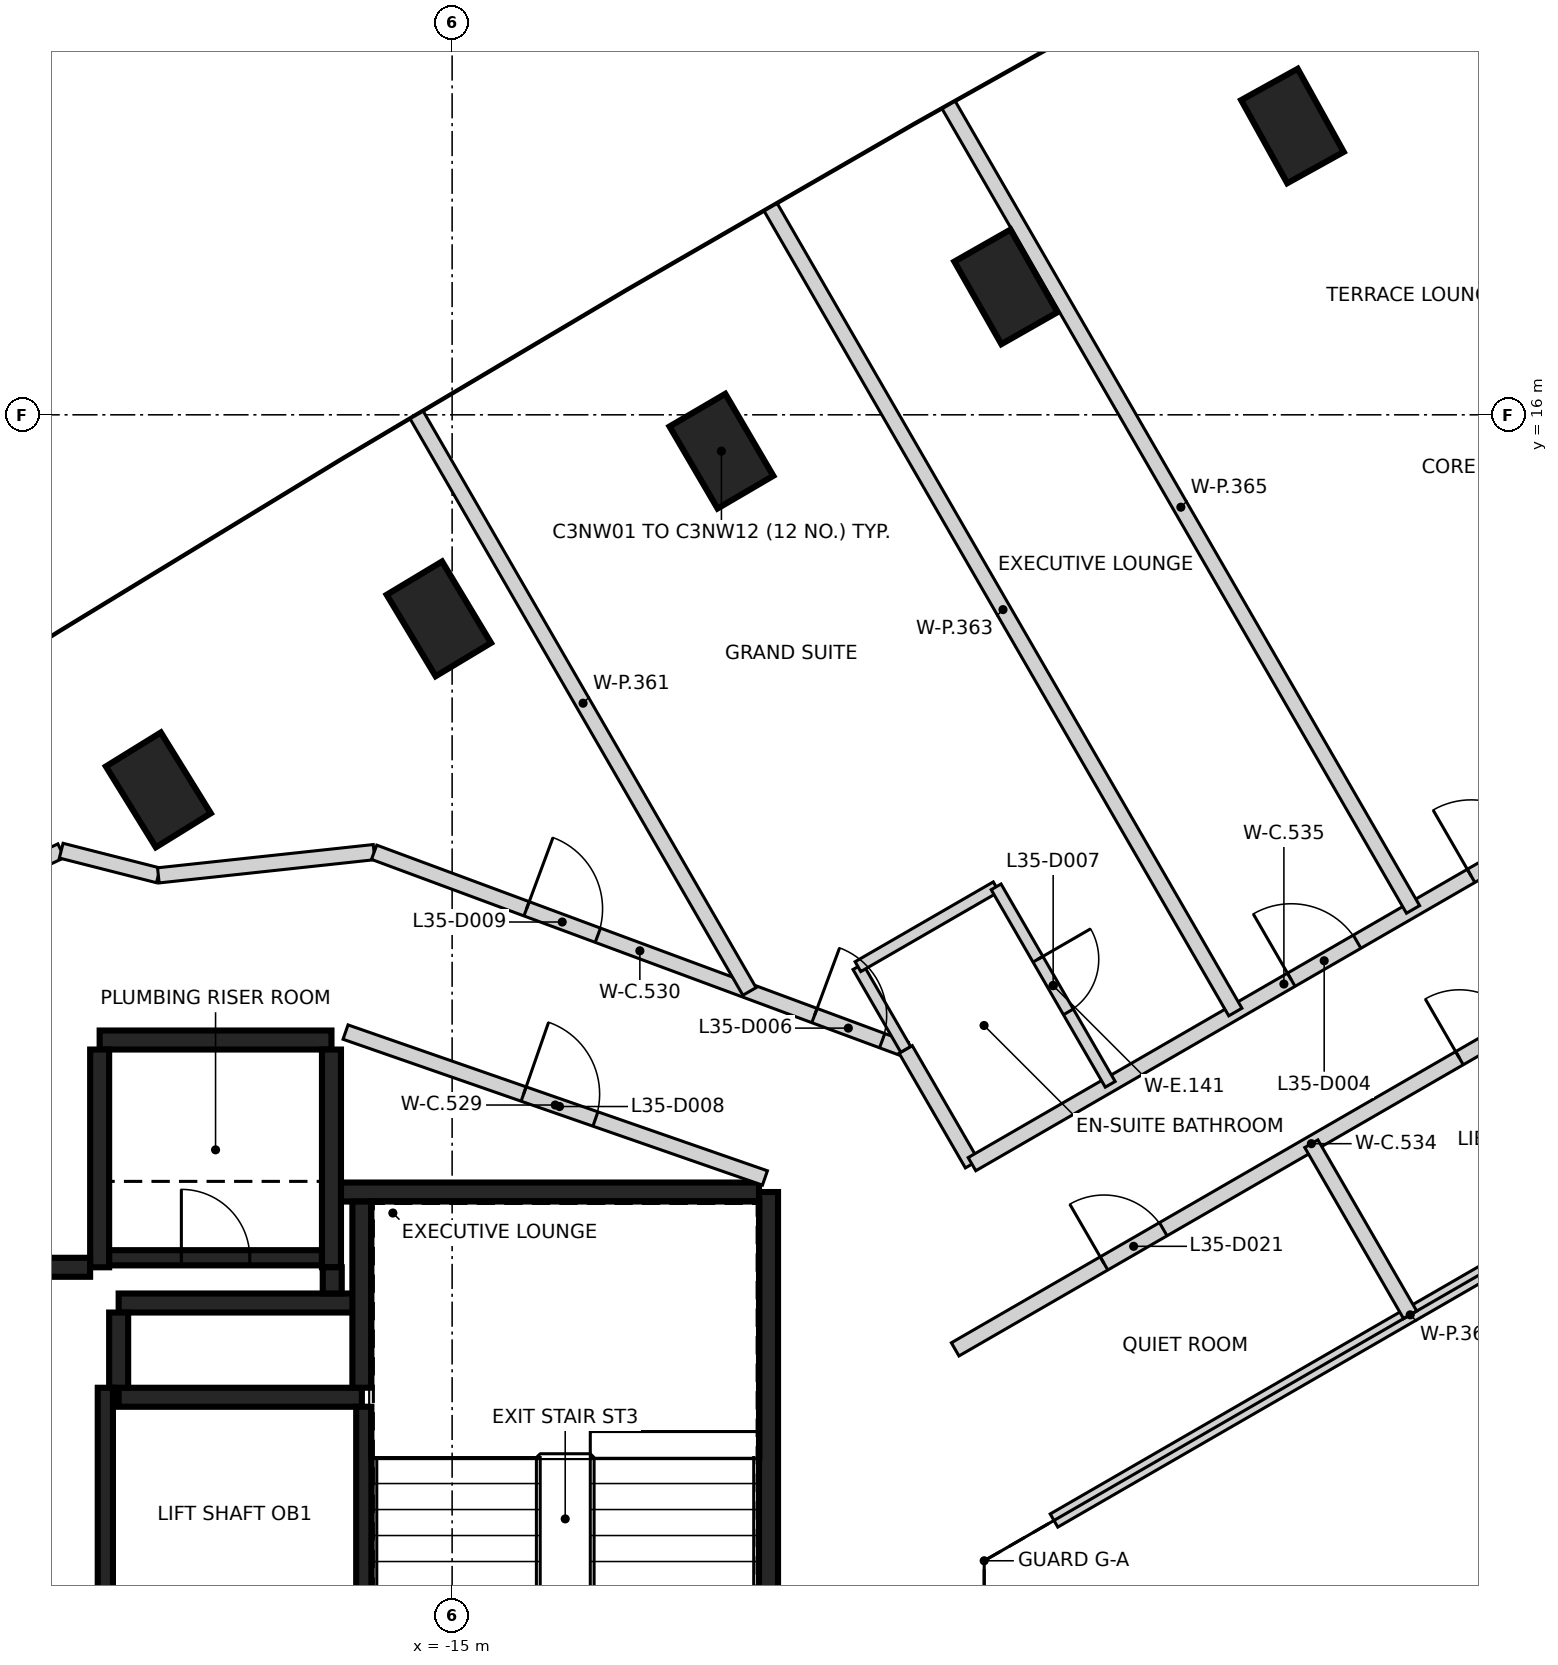
"""IFC4 building model, lengths in metres.
Left out: names, types, materials, properties, quantities, classifications, styles, units other than length and angle.
Written with IfcOpenShell. Run it as: python <this file> out.ifc"""

import sys

from ifc_helpers import new_model, si_unit, direction, frame, frame_2d, origin, origin_2d, place, context, subcontext, project, spatial, rectangle, extrude, element, fill, save


model = new_model("IFC4")
c1 = context("Model", 3, precision=1e-05, world=origin(), true_north=direction((0.0, 1.0)))
c2 = subcontext(c1, "Body", "Model", "MODEL_VIEW")
j1 = project(units=[si_unit("LENGTHUNIT", "METRE"), si_unit("PLANEANGLEUNIT", "RADIAN")], contexts=[c1])
p1 = place(None, origin())
s1 = spatial("IfcSite", under=j1, at=p1, CompositionType="ELEMENT")
p2 = place(p1, origin())
s2 = spatial("IfcBuilding", under=s1, at=p2, CompositionType="ELEMENT")
p3 = place(p2, frame((0.0, 0.0, 143.2)))
s3 = spatial("IfcBuildingStorey", under=s2, at=p3, CompositionType="ELEMENT", Elevation=143.2)
for number, where, z_axis, x_axis in (
    (1, (-3.945, 19.8, -0.4), (0.0, 0.0, 1.0), (-0.485, 0.875, 0.0)),
    (2, (-7.714, 17.683, -0.4), (0.0, 0.0, 1.0), (-0.495, 0.869, 0.0)),
    (3, (-11.457, 15.522, -0.4), (0.0, 0.0, 1.0), (-0.505, 0.863, 0.0)),
    (4, (-15.175, 13.316, -0.4), (0.0, 0.0, 1.0), (-0.515, 0.857, 0.0)),
    (5, (-18.865, 11.066, -0.4), (0.0, 0.0, 1.0), (-0.526, 0.851, 0.0)),
):
    element("IfcColumn", number, at=place(p3, frame(where, z_axis=z_axis, x_axis=x_axis)), inside=s3, PredefinedType="COLUMN", context=c2, shape_type="SweptSolid", body=[
        extrude(rectangle(XDim=1.25, YDim=0.85, at=origin_2d()), origin(), (0.0, 0.0, 1.0), 3.6),
    ])
p4 = place(p3, frame((-10.837, 5.775, 0.0), z_axis=(0.0, 0.0, 1.0), x_axis=(0.0, -1.0, 0.0)))
e6 = element("IfcWall", 6, at=p4, inside=s3, PredefinedType="SHEAR", context=c2, shape_type="SweptSolid", body=[
    extrude(rectangle(XDim=11.55, YDim=0.25, at=frame_2d((5.775, 0.0))), origin(), (0.0, 0.0, 1.0), 3.2),
])
p5 = place(p4, frame((10.025, 0.0, 0.0)))
e7 = element("IfcOpeningElement", 7, at=p5, cuts=e6, PredefinedType="OPENING", context=c2, shape_type="SweptSolid", body=[
    extrude(rectangle(XDim=1.2, YDim=2.1, at=frame_2d((0.6, 1.05))), frame((0.0, 0.135, 0.0), z_axis=(0.0, -1.0, 0.0), x_axis=(1.0, 0.0, 0.0)), (0.0, 0.0, 1.0), 0.27),
])
p6 = place(p4, frame((8.725, 0.0, 0.0)))
e8 = element("IfcOpeningElement", 8, at=p6, cuts=e6, PredefinedType="OPENING", context=c2, shape_type="SweptSolid", body=[
    extrude(rectangle(XDim=1.2, YDim=2.1, at=frame_2d((0.6, 1.05))), frame((0.0, 0.135, 0.0), z_axis=(0.0, -1.0, 0.0), x_axis=(1.0, 0.0, 0.0)), (0.0, 0.0, 1.0), 0.27),
])
p7 = place(p3, frame((-16.472, 5.775, 0.0), z_axis=(0.0, 0.0, 1.0), x_axis=(1.0, 0.0, 0.0)))
e9 = element("IfcWall", 9, at=p7, inside=s3, PredefinedType="SHEAR", context=c2, shape_type="SweptSolid", body=[
    extrude(rectangle(XDim=5.51, YDim=0.25, at=frame_2d((2.755, 0.0))), origin(), (0.0, 0.0, 1.0), 3.2),
])
p8 = place(p3, frame((-19.387, 3.075, 0.0), z_axis=(0.0, 0.0, 1.0), x_axis=(1.0, 0.0, 0.0)))
e10 = element("IfcWall", 10, at=p8, inside=s3, PredefinedType="SHEAR", context=c2, shape_type="SweptSolid", body=[
    extrude(rectangle(XDim=3.2, YDim=0.25, at=frame_2d((1.6, 0.0))), origin(), (0.0, 0.0, 1.0), 3.2),
])
p9 = place(p3, frame((-19.637, 7.775, 0.0), z_axis=(0.0, 0.0, 1.0), x_axis=(1.0, 0.0, 0.0)))
e11 = element("IfcWall", 11, at=p9, inside=s3, PredefinedType="SHEAR", context=c2, shape_type="SweptSolid", body=[
    extrude(rectangle(XDim=3.05, YDim=0.25, at=frame_2d((1.525, 0.0))), origin(), (0.0, 0.0, 1.0), 3.2),
])
for number, where, z_axis, x_axis in (
    (12, (-16.587, 7.65, 0.0), (0.0, 0.0, 1.0), (0.0, -1.0, 0.0)),
    (13, (-19.637, 4.785, 0.0), (0.0, 0.0, 1.0), (0.0, 1.0, 0.0)),
):
    element("IfcWall", number, at=place(p3, frame(where, z_axis=z_axis, x_axis=x_axis)), inside=s3, PredefinedType="SHEAR", context=c2, shape_type="SweptSolid", body=[
        extrude(rectangle(XDim=2.865, YDim=0.25, at=frame_2d((1.432, 0.0))), origin(), (0.0, 0.0, 1.0), 3.2),
    ])
p10 = place(p3, frame((-16.302, 4.315, 0.0), z_axis=(0.0, 0.0, 1.0), x_axis=(-1.0, 0.0, 0.0)))
e14 = element("IfcWall", 14, at=p10, inside=s3, PredefinedType="SHEAR", context=c2, shape_type="SweptSolid", body=[
    extrude(rectangle(XDim=3.085, YDim=0.25, at=frame_2d((1.542, 0.0))), origin(), (0.0, 0.0, 1.0), 3.2),
])
p11 = place(p3, frame((-16.187, 3.2, 0.0), z_axis=(0.0, 0.0, 1.0), x_axis=(0.0, 1.0, 0.0)))
e15 = element("IfcWall", 15, at=p11, inside=s3, PredefinedType="SHEAR", context=c2, shape_type="SweptSolid", body=[
    extrude(rectangle(XDim=2.449, YDim=0.25, at=frame_2d((1.225, 0.0))), origin(), (0.0, 0.0, 1.0), 3.2),
])
p12 = place(p3, frame((-19.387, 4.19, 0.0), z_axis=(0.0, 0.0, 1.0), x_axis=(0.0, -1.0, 0.0)))
e16 = element("IfcWall", 16, at=p12, inside=s3, PredefinedType="SHEAR", context=c2, shape_type="SweptSolid", body=[
    extrude(rectangle(XDim=0.989, YDim=0.25, at=frame_2d((0.495, 0.0))), origin(), (0.0, 0.0, 1.0), 3.2),
])
p13 = place(p3, frame((-20.447, 4.785, 0.0), z_axis=(0.0, 0.0, 1.0), x_axis=(1.0, 0.0, 0.0)))
e17 = element("IfcWall", 17, at=p13, inside=s3, PredefinedType="SHEAR", context=c2, shape_type="SweptSolid", body=[
    extrude(rectangle(XDim=0.685, YDim=0.25, at=frame_2d((0.342, 0.0))), origin(), (0.0, 0.0, 1.0), 3.2),
])
p14 = place(p3, frame((-16.577, 4.785, 0.0), z_axis=(0.0, 0.0, 1.0), x_axis=(0.0, -1.0, 0.0)))
e18 = element("IfcWall", 18, at=p14, inside=s3, PredefinedType="SHEAR", context=c2, shape_type="SweptSolid", body=[
    extrude(rectangle(XDim=0.344, YDim=0.25, at=frame_2d((0.172, 0.0))), origin(), (0.0, 0.0, 1.0), 3.2),
])
p15 = place(p3, frame((-16.162, 2.951, 0.0), z_axis=(0.0, 0.0, 1.0), x_axis=(0.0, -1.0, 0.0)))
e19 = element("IfcWall", 19, at=p15, inside=s3, PredefinedType="SHEAR", context=c2, shape_type="SweptSolid", body=[
    extrude(rectangle(XDim=5.851, YDim=0.2, at=frame_2d((2.925, 0.0))), origin(), (0.0, 0.0, 1.0), 3.2),
])
p16 = place(p3, frame((-19.562, -2.9, 0.0), z_axis=(0.0, 0.0, 1.0), x_axis=(0.0, 1.0, 0.0)))
e20 = element("IfcWall", 20, at=p16, inside=s3, PredefinedType="SHEAR", context=c2, shape_type="SweptSolid", body=[
    extrude(rectangle(XDim=6.1, YDim=0.2, at=frame_2d((3.05, 0.0))), origin(), (0.0, 0.0, 1.0), 3.2),
])
p17 = place(p3, frame((-19.511, 4.91, 0.0), z_axis=(0.0, 0.0, 1.0), x_axis=(1.0, 0.0, 0.0)))
e21 = element("IfcWall", 21, at=p17, inside=s3, PredefinedType="SHEAR", context=c2, shape_type="SweptSolid", body=[
    extrude(rectangle(XDim=2.798, YDim=0.2, at=frame_2d((1.399, 0.0))), origin(), (0.0, 0.0, 1.0), 3.2),
])
p18 = place(p17, frame((0.949, 0.0, 0.0)))
e22 = element("IfcOpeningElement", 22, at=p18, cuts=e21, PredefinedType="OPENING", context=c2, shape_type="SweptSolid", body=[
    extrude(rectangle(XDim=0.9, YDim=2.1, at=frame_2d((0.45, 1.05))), frame((0.0, 0.11, 0.0), z_axis=(0.0, -1.0, 0.0), x_axis=(1.0, 0.0, 0.0)), (0.0, 0.0, 1.0), 0.22),
])
p19 = place(p3, frame((-21.521, 9.614, 0.0), z_axis=(0.0, 0.0, 1.0), x_axis=(0.904083527367, 0.427355795028, 0.0)))
e23 = element("IfcWall", 23, at=p19, inside=s3, PredefinedType="PARTITIONING", context=c2, shape_type="SweptSolid", body=[
    extrude(rectangle(XDim=1.523, YDim=0.2, at=frame_2d((0.761, 0.0))), origin(), (0.0, 0.0, 1.0), 2.3),
])
p20 = place(p3, frame((-20.143, 10.266, 0.0), z_axis=(0.0, 0.0, 1.0), x_axis=(0.969121308325, -0.246584447505, 0.0)))
e24 = element("IfcWall", 24, at=p20, inside=s3, PredefinedType="PARTITIONING", context=c2, shape_type="SweptSolid", body=[
    extrude(rectangle(XDim=1.319, YDim=0.2, at=frame_2d((0.659, 0.0))), origin(), (0.0, 0.0, 1.0), 2.3),
])
p21 = place(p3, frame((-18.865, 9.941, 0.0), z_axis=(0.0, 0.0, 1.0), x_axis=(0.99423123086, 0.107257911519, 0.0)))
e25 = element("IfcWall", 25, at=p21, inside=s3, PredefinedType="PARTITIONING", context=c2, shape_type="SweptSolid", body=[
    extrude(rectangle(XDim=2.854, YDim=0.2, at=frame_2d((1.427, 0.0))), origin(), (0.0, 0.0, 1.0), 3.2),
])
p22 = place(p3, frame((-16.402, 7.879, 0.0), z_axis=(0.0, 0.0, 1.0), x_axis=(0.94449961557, -0.328512520596, 0.0)))
e26 = element("IfcWall", 26, at=p22, inside=s3, PredefinedType="PARTITIONING", context=c2, shape_type="SweptSolid", body=[
    extrude(rectangle(XDim=5.842, YDim=0.2, at=frame_2d((2.921, 0.0))), origin(), (0.0, 0.0, 1.0), 3.2),
])
p23 = place(p22, frame((2.481, 0.0, 0.0)))
e27 = element("IfcOpeningElement", 27, at=p23, cuts=e26, PredefinedType="OPENING", context=c2, shape_type="SweptSolid", body=[
    extrude(rectangle(XDim=1.0, YDim=2.1, at=frame_2d((0.5, 1.05))), frame((0.0, 0.11, 0.0), z_axis=(0.0, -1.0, 0.0), x_axis=(1.0, 0.0, 0.0)), (0.0, 0.0, 1.0), 0.22),
])
p24 = place(p3, frame((-16.026, 10.245, 0.0), z_axis=(0.0, 0.0, 1.0), x_axis=(0.937607706988, -0.347694963721, 0.0)))
e28 = element("IfcWall", 28, at=p24, inside=s3, PredefinedType="PARTITIONING", context=c2, shape_type="SweptSolid", body=[
    extrude(rectangle(XDim=7.458, YDim=0.2, at=frame_2d((3.729, 0.0))), origin(), (0.0, 0.0, 1.0), 3.2),
])
p25 = place(p24, frame((6.179, 0.0, 0.0)))
e29 = element("IfcOpeningElement", 29, at=p25, cuts=e28, PredefinedType="OPENING", context=c2, shape_type="SweptSolid", body=[
    extrude(rectangle(XDim=0.95, YDim=2.1, at=frame_2d((0.475, 1.05))), frame((0.0, 0.11, 0.0), z_axis=(0.0, -1.0, 0.0), x_axis=(1.0, 0.0, 0.0)), (0.0, 0.0, 1.0), 0.22),
])
p26 = place(p24, frame((2.139, 0.0, 0.0)))
e30 = element("IfcOpeningElement", 30, at=p26, cuts=e28, PredefinedType="OPENING", context=c2, shape_type="SweptSolid", body=[
    extrude(rectangle(XDim=1.0, YDim=2.1, at=frame_2d((0.5, 1.05))), frame((0.0, 0.11, 0.0), z_axis=(0.0, -1.0, 0.0), x_axis=(1.0, 0.0, 0.0)), (0.0, 0.0, 1.0), 0.22),
])
p27 = place(p3, frame((-9.033, 7.651, 0.0), z_axis=(0.0, 0.0, 1.0), x_axis=(0.500417633986, -0.865784148386, 0.0)))
e31 = element("IfcWall", 31, at=p27, inside=s3, PredefinedType="PARTITIONING", context=c2, shape_type="SweptSolid", body=[
    extrude(rectangle(XDim=1.743, YDim=0.2, at=frame_2d((0.871, 0.0))), origin(), (0.0, 0.0, 1.0), 3.2),
])
p28 = place(p3, frame((-8.382, 3.705, 0.0), z_axis=(0.0, 0.0, 1.0), x_axis=(0.866012036978, 0.500023151273, 0.0)))
e32 = element("IfcWall", 32, at=p28, inside=s3, PredefinedType="PARTITIONING", context=c2, shape_type="SweptSolid", body=[
    extrude(rectangle(XDim=10.823, YDim=0.2, at=frame_2d((5.412, 0.0))), origin(), (0.0, 0.0, 1.0), 3.2),
])
p29 = place(p28, frame((7.661, 0.0, 0.0)))
e33 = element("IfcOpeningElement", 33, at=p29, cuts=e32, PredefinedType="OPENING", context=c2, shape_type="SweptSolid", body=[
    extrude(rectangle(XDim=0.9, YDim=2.1, at=frame_2d((0.45, 1.05))), frame((0.0, 0.11, 0.0), z_axis=(0.0, -1.0, 0.0), x_axis=(1.0, 0.0, 0.0)), (0.0, 0.0, 1.0), 0.22),
])
p30 = place(p28, frame((2.261, 0.0, 0.0)))
e34 = element("IfcOpeningElement", 34, at=p30, cuts=e32, PredefinedType="OPENING", context=c2, shape_type="SweptSolid", body=[
    extrude(rectangle(XDim=0.9, YDim=2.1, at=frame_2d((0.45, 1.05))), frame((0.0, 0.11, 0.0), z_axis=(0.0, -1.0, 0.0), x_axis=(1.0, 0.0, 0.0)), (0.0, 0.0, 1.0), 0.22),
])
p31 = place(p3, frame((-8.161, 6.142, 0.0), z_axis=(0.0, 0.0, 1.0), x_axis=(0.865927304867, 0.500169873828, 0.0)))
e35 = element("IfcWall", 35, at=p31, inside=s3, PredefinedType="PARTITIONING", context=c2, shape_type="SweptSolid", body=[
    extrude(rectangle(XDim=9.478, YDim=0.2, at=frame_2d((4.739, 0.0))), origin(), (0.0, 0.0, 1.0), 3.2),
])
p32 = place(p31, frame((4.851, 0.0, 0.0)))
e36 = element("IfcOpeningElement", 36, at=p32, cuts=e35, PredefinedType="OPENING", context=c2, shape_type="SweptSolid", body=[
    extrude(rectangle(XDim=1.0, YDim=2.1, at=frame_2d((0.5, 1.05))), frame((0.0, 0.11, 0.0), z_axis=(0.0, -1.0, 0.0), x_axis=(1.0, 0.0, 0.0)), (0.0, 0.0, 1.0), 0.22),
])
p33 = place(p31, frame((7.583, 0.0, 0.0)))
e37 = element("IfcOpeningElement", 37, at=p33, cuts=e35, PredefinedType="OPENING", context=c2, shape_type="SweptSolid", body=[
    extrude(rectangle(XDim=1.0, YDim=2.1, at=frame_2d((0.5, 1.05))), frame((0.0, 0.11, 0.0), z_axis=(0.0, -1.0, 0.0), x_axis=(1.0, 0.0, 0.0)), (0.0, 0.0, 1.0), 0.22),
])
p34 = place(p3, frame((-15.467, 15.998, 0.0), z_axis=(0.0, 0.0, 1.0), x_axis=(0.500003998589, -0.866023095186, 0.0)))
e38 = element("IfcWall", 38, at=p34, inside=s3, PredefinedType="PARTITIONING", context=c2, shape_type="SweptSolid", body=[
    extrude(rectangle(XDim=8.757, YDim=0.2, at=frame_2d((4.379, 0.0))), origin(), (0.0, 0.0, 1.0), 2.3),
])
p35 = place(p3, frame((-10.809, 18.731, 0.0), z_axis=(0.0, 0.0, 1.0), x_axis=(0.500004774777, -0.866022647048, 0.0)))
e39 = element("IfcWall", 39, at=p35, inside=s3, PredefinedType="PARTITIONING", context=c2, shape_type="SweptSolid", body=[
    extrude(rectangle(XDim=12.227, YDim=0.2, at=frame_2d((6.113, 0.0))), origin(), (0.0, 0.0, 1.0), 2.3),
])
p36 = place(p3, frame((-8.468, 20.076, 0.0), z_axis=(0.0, 0.0, 1.0), x_axis=(0.499961688474, -0.866047521824, 0.0)))
e40 = element("IfcWall", 40, at=p36, inside=s3, PredefinedType="PARTITIONING", context=c2, shape_type="SweptSolid", body=[
    extrude(rectangle(XDim=12.22, YDim=0.2, at=frame_2d((6.11, 0.0))), origin(), (0.0, 0.0, 1.0), 2.3),
])
p37 = place(p3, frame((-7.082, 1.453, 0.0), z_axis=(0.0, 0.0, 1.0), x_axis=(0.866010525116, 0.500025769724, 0.0)))
e41 = element("IfcWall", 41, at=p37, inside=s3, PredefinedType="PARTITIONING", context=c2, shape_type="SweptSolid", body=[
    extrude(rectangle(XDim=10.823, YDim=0.2, at=frame_2d((5.411, 0.0))), origin(), (0.0, 0.0, 1.0), 2.3),
])
p38 = place(p3, frame((-3.696, 6.411, 0.0), z_axis=(0.0, 0.0, 1.0), x_axis=(0.500006934395, -0.866021400173, 0.0)))
e42 = element("IfcWall", 42, at=p38, inside=s3, PredefinedType="PARTITIONING", context=c2, shape_type="SweptSolid", body=[
    extrude(rectangle(XDim=2.6, YDim=0.2, at=frame_2d((1.3, 0.0))), origin(), (0.0, 0.0, 1.0), 2.3),
])
p39 = place(p3, frame((-9.661, 8.74, 0.0), z_axis=(0.0, 0.0, 1.0), x_axis=(0.49990192124, -0.866082022179, 0.0)))
e43 = element("IfcWall", 43, at=p39, inside=s3, PredefinedType="PARTITIONING", context=c2, shape_type="SweptSolid", body=[
    extrude(rectangle(XDim=1.256, YDim=0.15, at=frame_2d((0.628, 0.0))), origin(), (0.0, 0.0, 1.0), 3.2),
])
p40 = place(p3, frame((-9.661, 8.74, 0.0), z_axis=(0.0, 0.0, 1.0), x_axis=(0.865922159541, 0.500178781653, 0.0)))
e44 = element("IfcWall", 44, at=p40, inside=s3, PredefinedType="PARTITIONING", context=c2, shape_type="SweptSolid", body=[
    extrude(rectangle(XDim=2.099, YDim=0.15, at=frame_2d((1.05, 0.0))), origin(), (0.0, 0.0, 1.0), 3.2),
])
p41 = place(p3, frame((-7.843, 9.79, 0.0), z_axis=(0.0, 0.0, 1.0), x_axis=(0.500234218456, -0.865890135459, 0.0)))
e45 = element("IfcWall", 45, at=p41, inside=s3, PredefinedType="PARTITIONING", context=c2, shape_type="SweptSolid", body=[
    extrude(rectangle(XDim=3.0, YDim=0.15, at=frame_2d((1.5, 0.0))), origin(), (0.0, 0.0, 1.0), 3.2),
])
p42 = place(p41, frame((1.1, 0.0, 0.0)))
e46 = element("IfcOpeningElement", 46, at=p42, cuts=e45, PredefinedType="OPENING", context=c2, shape_type="SweptSolid", body=[
    extrude(rectangle(XDim=0.8, YDim=2.1, at=frame_2d((0.4, 1.05))), frame((0.0, 0.085, 0.0), z_axis=(0.0, -1.0, 0.0), x_axis=(1.0, 0.0, 0.0)), (0.0, 0.0, 1.0), 0.17),
])
p43 = place(p18, origin())
e47 = element("IfcDoor", 47, at=p43, inside=s3, OperationType="SINGLE_SWING_RIGHT", PredefinedType="DOOR", context=c2, shape_type="SweptSolid", body=[
    extrude(rectangle(XDim=0.9, YDim=2.1, at=frame_2d((0.45, 1.05))), frame((0.0, 0.025, 0.0), z_axis=(0.0, -1.0, 0.0), x_axis=(1.0, 0.0, 0.0)), (0.0, 0.0, 1.0), 0.05),
])
fill(e22, e47)
p44 = place(p32, origin())
e48 = element("IfcDoor", 48, at=p44, inside=s3, OperationType="SINGLE_SWING_LEFT", PredefinedType="DOOR", context=c2, shape_type="SweptSolid", body=[
    extrude(rectangle(XDim=1.0, YDim=2.1, at=frame_2d((0.5, 1.05))), frame((0.0, 0.025, 0.0), z_axis=(0.0, -1.0, 0.0), x_axis=(1.0, 0.0, 0.0)), (0.0, 0.0, 1.0), 0.05),
])
fill(e36, e48)
p45 = place(p33, origin())
e49 = element("IfcDoor", 49, at=p45, inside=s3, OperationType="SINGLE_SWING_LEFT", PredefinedType="DOOR", context=c2, shape_type="SweptSolid", body=[
    extrude(rectangle(XDim=1.0, YDim=2.1, at=frame_2d((0.5, 1.05))), frame((0.0, 0.025, 0.0), z_axis=(0.0, -1.0, 0.0), x_axis=(1.0, 0.0, 0.0)), (0.0, 0.0, 1.0), 0.05),
])
fill(e37, e49)
p46 = place(p25, origin())
e50 = element("IfcDoor", 50, at=p46, inside=s3, OperationType="SINGLE_SWING_LEFT", PredefinedType="DOOR", context=c2, shape_type="SweptSolid", body=[
    extrude(rectangle(XDim=0.95, YDim=2.1, at=frame_2d((0.475, 1.05))), frame((0.0, 0.025, 0.0), z_axis=(0.0, -1.0, 0.0), x_axis=(1.0, 0.0, 0.0)), (0.0, 0.0, 1.0), 0.05),
])
fill(e29, e50)
p47 = place(p42, frame((0.8, 0.0, 0.0), z_axis=(0.0, 0.0, 1.0), x_axis=(-1.0, 0.0, 0.0)))
e51 = element("IfcDoor", 51, at=p47, inside=s3, OperationType="SINGLE_SWING_LEFT", PredefinedType="DOOR", context=c2, shape_type="SweptSolid", body=[
    extrude(rectangle(XDim=0.8, YDim=2.1, at=frame_2d((0.4, 1.05))), frame((0.0, 0.025, 0.0), z_axis=(0.0, -1.0, 0.0), x_axis=(1.0, 0.0, 0.0)), (0.0, 0.0, 1.0), 0.05),
])
fill(e46, e51)
p48 = place(p23, frame((1.0, 0.0, 0.0), z_axis=(0.0, 0.0, 1.0), x_axis=(-1.0, 0.0, 0.0)))
e52 = element("IfcDoor", 52, at=p48, inside=s3, OperationType="SINGLE_SWING_LEFT", PredefinedType="DOOR", context=c2, shape_type="SweptSolid", body=[
    extrude(rectangle(XDim=1.0, YDim=2.1, at=frame_2d((0.5, 1.05))), frame((0.0, 0.025, 0.0), z_axis=(0.0, -1.0, 0.0), x_axis=(1.0, 0.0, 0.0)), (0.0, 0.0, 1.0), 0.05),
])
fill(e27, e52)
p49 = place(p26, frame((1.0, 0.0, 0.0), z_axis=(0.0, 0.0, 1.0), x_axis=(-1.0, 0.0, 0.0)))
e53 = element("IfcDoor", 53, at=p49, inside=s3, OperationType="SINGLE_SWING_LEFT", PredefinedType="DOOR", context=c2, shape_type="SweptSolid", body=[
    extrude(rectangle(XDim=1.0, YDim=2.1, at=frame_2d((0.5, 1.05))), frame((0.0, 0.025, 0.0), z_axis=(0.0, -1.0, 0.0), x_axis=(1.0, 0.0, 0.0)), (0.0, 0.0, 1.0), 0.05),
])
fill(e30, e53)
p50 = place(p29, frame((0.9, 0.0, 0.0), z_axis=(0.0, 0.0, 1.0), x_axis=(-1.0, 0.0, 0.0)))
e54 = element("IfcDoor", 54, at=p50, inside=s3, OperationType="SINGLE_SWING_LEFT", PredefinedType="DOOR", context=c2, shape_type="SweptSolid", body=[
    extrude(rectangle(XDim=0.9, YDim=2.1, at=frame_2d((0.45, 1.05))), frame((0.0, 0.025, 0.0), z_axis=(0.0, -1.0, 0.0), x_axis=(1.0, 0.0, 0.0)), (0.0, 0.0, 1.0), 0.05),
])
fill(e33, e54)
p51 = place(p30, frame((0.9, 0.0, 0.0), z_axis=(0.0, 0.0, 1.0), x_axis=(-1.0, 0.0, 0.0)))
e55 = element("IfcDoor", 55, at=p51, inside=s3, OperationType="SINGLE_SWING_LEFT", PredefinedType="DOOR", context=c2, shape_type="SweptSolid", body=[
    extrude(rectangle(XDim=0.9, YDim=2.1, at=frame_2d((0.45, 1.05))), frame((0.0, 0.025, 0.0), z_axis=(0.0, -1.0, 0.0), x_axis=(1.0, 0.0, 0.0)), (0.0, 0.0, 1.0), 0.05),
])
fill(e34, e55)
save(model, sys.argv[1])
